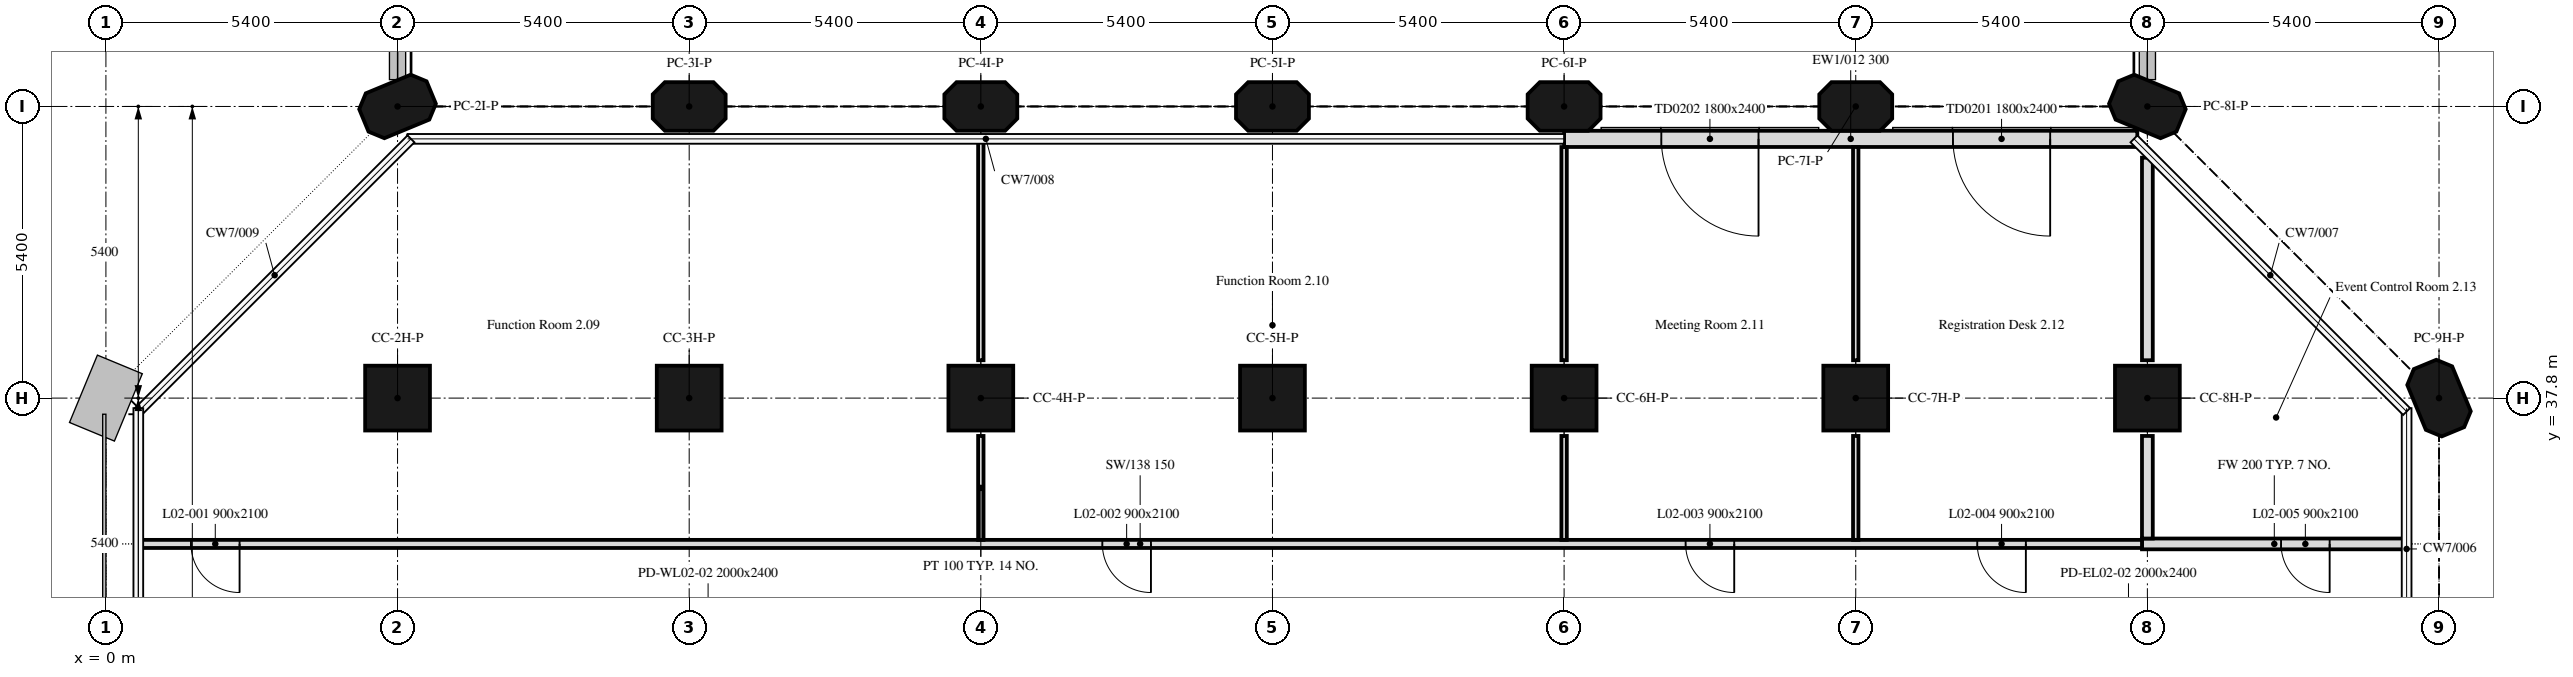
"""IFC4 building model, lengths in metres.
Left out: names, types, materials, properties, quantities, classifications, styles, units other than length and angle.
Written with IfcOpenShell. Run it as: python <this file> out.ifc"""

import sys

from ifc_helpers import new_model, si_unit, direction, frame, frame_2d, origin, origin_2d, place, context, subcontext, project, spatial, polyline, rectangle, outline, extrude, element, fill, save


model = new_model("IFC4")
c1 = context("Model", 3, precision=1e-05, world=origin(), true_north=direction((0.0, 1.0)))
c2 = subcontext(c1, "Body", "Model", "MODEL_VIEW")
j1 = project(units=[si_unit("LENGTHUNIT", "METRE"), si_unit("PLANEANGLEUNIT", "RADIAN")], contexts=[c1])
p1 = place(None, origin())
s1 = spatial("IfcSite", under=j1, at=p1, CompositionType="ELEMENT")
p2 = place(p1, origin())
s2 = spatial("IfcBuilding", under=s1, at=p2, CompositionType="ELEMENT")
p3 = place(p2, frame((0.0, 0.0, 14.4)))
s3 = spatial("IfcBuildingStorey", under=s2, at=p3, CompositionType="ELEMENT", Elevation=14.4)
for number, where, z_axis, x_axis in (
    (1, (5.4, 37.8, 0.0), (0.0, 0.0, 1.0), (1.0, 0.0, 0.0)),
    (2, (10.8, 37.8, 0.0), (0.0, 0.0, 1.0), (1.0, 0.0, 0.0)),
    (3, (16.2, 37.8, 0.0), (0.0, 0.0, 1.0), (1.0, 0.0, 0.0)),
    (4, (21.6, 37.8, 0.0), (0.0, 0.0, 1.0), (1.0, 0.0, 0.0)),
    (5, (27.0, 37.8, 0.0), (0.0, 0.0, 1.0), (1.0, 0.0, 0.0)),
    (6, (32.4, 37.8, 0.0), (0.0, 0.0, 1.0), (1.0, 0.0, 0.0)),
    (7, (37.8, 37.8, 0.0), (0.0, 0.0, 1.0), (1.0, 0.0, 0.0)),
):
    element("IfcColumn", number, at=place(p3, frame(where, z_axis=z_axis, x_axis=x_axis)), inside=s3, PredefinedType="COLUMN", context=c2, shape_type="SweptSolid", body=[
        extrude(rectangle(XDim=1.2, YDim=1.2, at=origin_2d()), origin(), (0.0, 0.0, 1.0), 5.0),
    ])
for number, where, z_axis, x_axis in (
    (8, (43.2, 37.8, 0.0), (0.0, 0.0, 1.0), (-0.383, 0.924, 0.0)),
    (9, (5.4, 43.2, 0.0), (0.0, 0.0, 1.0), (0.924, 0.383, 0.0)),
    (10, (10.8, 43.2, 0.0), (0.0, 0.0, 1.0), (1.0, 0.0, 0.0)),
    (11, (16.2, 43.2, 0.0), (0.0, 0.0, 1.0), (1.0, 0.0, 0.0)),
    (12, (21.6, 43.2, 0.0), (0.0, 0.0, 1.0), (1.0, 0.0, 0.0)),
    (13, (27.0, 43.2, 0.0), (0.0, 0.0, 1.0), (1.0, 0.0, 0.0)),
    (14, (32.4, 43.2, 0.0), (0.0, 0.0, 1.0), (1.0, 0.0, 0.0)),
    (15, (37.8, 43.2, 0.0), (0.0, 0.0, 1.0), (-0.924, 0.383, 0.0)),
):
    element("IfcColumn", number, at=place(p3, frame(where, z_axis=z_axis, x_axis=x_axis)), inside=s3, PredefinedType="COLUMN", context=c2, shape_type="SweptSolid", body=[
        extrude(outline(polyline([(-0.45, -0.45), (0.45, -0.45), (0.675, -0.225), (0.675, 0.225), (0.45, 0.45), (-0.45, 0.45), (-0.675, 0.225), (-0.675, -0.225), (-0.45, -0.45)])), origin(), (0.0, 0.0, 1.0), 5.0),
    ])
p4 = place(p3, frame((37.614, 42.6, 0.0), z_axis=(0.0, 0.0, 1.0), x_axis=(-1.0, 0.0, 0.0)))
e16 = element("IfcWall", 16, at=p4, inside=s3, PredefinedType="SOLIDWALL", context=c2, shape_type="SweptSolid", body=[
    extrude(rectangle(XDim=10.614, YDim=0.3, at=frame_2d((5.307, 0.0))), origin(), (0.0, 0.0, 1.0), 5.0),
])
p5 = place(p4, frame((1.614, 0.0, 0.0)))
e17 = element("IfcOpeningElement", 17, at=p5, cuts=e16, PredefinedType="OPENING", context=c2, shape_type="SweptSolid", body=[
    extrude(rectangle(XDim=1.8, YDim=2.4, at=frame_2d((0.9, 1.2))), frame((0.0, 0.16, 0.0), z_axis=(0.0, -1.0, 0.0), x_axis=(1.0, 0.0, 0.0)), (0.0, 0.0, 1.0), 0.32),
])
p6 = place(p4, frame((7.014, 0.0, 0.0)))
e18 = element("IfcOpeningElement", 18, at=p6, cuts=e16, PredefinedType="OPENING", context=c2, shape_type="SweptSolid", body=[
    extrude(rectangle(XDim=1.8, YDim=2.4, at=frame_2d((0.9, 1.2))), frame((0.0, 0.16, 0.0), z_axis=(0.0, -1.0, 0.0), x_axis=(1.0, 0.0, 0.0)), (0.0, 0.0, 1.0), 0.32),
])
p7 = place(p3, frame((42.6, 35.1, 0.0), z_axis=(0.0, 0.0, 1.0), x_axis=(-1.0, 0.0, 0.0)))
e19 = element("IfcWall", 19, at=p7, inside=s3, PredefinedType="PARTITIONING", context=c2, shape_type="SweptSolid", body=[
    extrude(rectangle(XDim=4.9, YDim=0.2, at=frame_2d((2.45, 0.0))), origin(), (0.0, 0.0, 1.0), 5.0),
])
p8 = place(p7, frame((1.425, 0.0, 0.0)))
e20 = element("IfcOpeningElement", 20, at=p8, cuts=e19, PredefinedType="OPENING", context=c2, shape_type="SweptSolid", body=[
    extrude(rectangle(XDim=0.9, YDim=2.1, at=frame_2d((0.45, 1.05))), frame((0.0, 0.1, 0.0), z_axis=(0.0, -1.0, 0.0), x_axis=(1.0, 0.0, 0.0)), (0.0, 0.0, 1.0), 0.2),
])
p9 = place(p3, frame((37.7, 35.1, 0.0), z_axis=(0.0, 0.0, 1.0), x_axis=(-1.0, 0.0, 0.0)))
e21 = element("IfcWall", 21, at=p9, inside=s3, PredefinedType="PARTITIONING", context=c2, shape_type="SweptSolid", body=[
    extrude(rectangle(XDim=37.1, YDim=0.15, at=frame_2d((18.55, 0.0))), origin(), (0.0, 0.0, 1.0), 5.0),
])
p10 = place(p9, frame((35.225, 0.0, 0.0)))
e22 = element("IfcOpeningElement", 22, at=p10, cuts=e21, PredefinedType="OPENING", context=c2, shape_type="SweptSolid", body=[
    extrude(rectangle(XDim=0.9, YDim=2.1, at=frame_2d((0.45, 1.05))), frame((0.0, 0.075, 0.0), z_axis=(0.0, -1.0, 0.0), x_axis=(1.0, 0.0, 0.0)), (0.0, 0.0, 1.0), 0.15),
])
p11 = place(p9, frame((18.35, 0.0, 0.0)))
e23 = element("IfcOpeningElement", 23, at=p11, cuts=e21, PredefinedType="OPENING", context=c2, shape_type="SweptSolid", body=[
    extrude(rectangle(XDim=0.9, YDim=2.1, at=frame_2d((0.45, 1.05))), frame((0.0, 0.075, 0.0), z_axis=(0.0, -1.0, 0.0), x_axis=(1.0, 0.0, 0.0)), (0.0, 0.0, 1.0), 0.15),
])
p12 = place(p9, frame((7.55, 0.0, 0.0)))
e24 = element("IfcOpeningElement", 24, at=p12, cuts=e21, PredefinedType="OPENING", context=c2, shape_type="SweptSolid", body=[
    extrude(rectangle(XDim=0.9, YDim=2.1, at=frame_2d((0.45, 1.05))), frame((0.0, 0.075, 0.0), z_axis=(0.0, -1.0, 0.0), x_axis=(1.0, 0.0, 0.0)), (0.0, 0.0, 1.0), 0.15),
])
p13 = place(p9, frame((2.15, 0.0, 0.0)))
e25 = element("IfcOpeningElement", 25, at=p13, cuts=e21, PredefinedType="OPENING", context=c2, shape_type="SweptSolid", body=[
    extrude(rectangle(XDim=0.9, YDim=2.1, at=frame_2d((0.45, 1.05))), frame((0.0, 0.075, 0.0), z_axis=(0.0, -1.0, 0.0), x_axis=(1.0, 0.0, 0.0)), (0.0, 0.0, 1.0), 0.15),
])
p14 = place(p3, frame((16.2, 35.175, 0.0), z_axis=(0.0, 0.0, 1.0), x_axis=(0.0, 1.0, 0.0)))
e26 = element("IfcWall", 26, at=p14, inside=s3, PredefinedType="PARTITIONING", context=c2, shape_type="SweptSolid", body=[
    extrude(rectangle(XDim=1.924, YDim=0.1, at=frame_2d((0.962, 0.0))), origin(), (0.0, 0.0, 1.0), 5.0),
])
p15 = place(p3, frame((16.2, 38.501, 0.0), z_axis=(0.0, 0.0, 1.0), x_axis=(0.0, 1.0, 0.0)))
e27 = element("IfcWall", 27, at=p15, inside=s3, PredefinedType="PARTITIONING", context=c2, shape_type="SweptSolid", body=[
    extrude(rectangle(XDim=4.099, YDim=0.1, at=frame_2d((2.05, 0.0))), origin(), (0.0, 0.0, 1.0), 5.0),
])
p16 = place(p3, frame((27.0, 35.175, 0.0), z_axis=(0.0, 0.0, 1.0), x_axis=(0.0, 1.0, 0.0)))
e28 = element("IfcWall", 28, at=p16, inside=s3, PredefinedType="PARTITIONING", context=c2, shape_type="SweptSolid", body=[
    extrude(rectangle(XDim=1.924, YDim=0.1, at=frame_2d((0.962, 0.0))), origin(), (0.0, 0.0, 1.0), 5.0),
])
p17 = place(p3, frame((27.0, 38.501, 0.0), z_axis=(0.0, 0.0, 1.0), x_axis=(0.0, 1.0, 0.0)))
e29 = element("IfcWall", 29, at=p17, inside=s3, PredefinedType="PARTITIONING", context=c2, shape_type="SweptSolid", body=[
    extrude(rectangle(XDim=3.948, YDim=0.1, at=frame_2d((1.974, 0.0))), origin(), (0.0, 0.0, 1.0), 5.0),
])
p18 = place(p3, frame((32.4, 35.175, 0.0), z_axis=(0.0, 0.0, 1.0), x_axis=(0.0, 1.0, 0.0)))
e30 = element("IfcWall", 30, at=p18, inside=s3, PredefinedType="PARTITIONING", context=c2, shape_type="SweptSolid", body=[
    extrude(rectangle(XDim=1.924, YDim=0.1, at=frame_2d((0.962, 0.0))), origin(), (0.0, 0.0, 1.0), 5.0),
])
p19 = place(p3, frame((32.4, 38.501, 0.0), z_axis=(0.0, 0.0, 1.0), x_axis=(0.0, 1.0, 0.0)))
e31 = element("IfcWall", 31, at=p19, inside=s3, PredefinedType="PARTITIONING", context=c2, shape_type="SweptSolid", body=[
    extrude(rectangle(XDim=3.948, YDim=0.1, at=frame_2d((1.974, 0.0))), origin(), (0.0, 0.0, 1.0), 5.0),
])
p20 = place(p3, frame((37.8, 35.2, 0.0), z_axis=(0.0, 0.0, 1.0), x_axis=(0.0, 1.0, 0.0)))
e32 = element("IfcWall", 32, at=p20, inside=s3, PredefinedType="PARTITIONING", context=c2, shape_type="SweptSolid", body=[
    extrude(rectangle(XDim=1.899, YDim=0.2, at=frame_2d((0.95, 0.0))), origin(), (0.0, 0.0, 1.0), 5.0),
])
p21 = place(p3, frame((37.8, 38.501, 0.0), z_axis=(0.0, 0.0, 1.0), x_axis=(0.0, 1.0, 0.0)))
e33 = element("IfcWall", 33, at=p21, inside=s3, PredefinedType="PARTITIONING", context=c2, shape_type="SweptSolid", body=[
    extrude(rectangle(XDim=3.751, YDim=0.2, at=frame_2d((1.875, 0.0))), origin(), (0.0, 0.0, 1.0), 5.0),
])
p22 = place(p5, origin())
e34 = element("IfcDoor", 34, at=p22, inside=s3, OperationType="DOUBLE_DOOR_DOUBLE_SWING", PredefinedType="DOOR", context=c2, shape_type="SweptSolid", body=[
    extrude(rectangle(XDim=1.8, YDim=2.4, at=frame_2d((0.9, 1.2))), frame((0.0, 0.025, 0.0), z_axis=(0.0, -1.0, 0.0), x_axis=(1.0, 0.0, 0.0)), (0.0, 0.0, 1.0), 0.05),
])
fill(e17, e34)
p23 = place(p6, origin())
e35 = element("IfcDoor", 35, at=p23, inside=s3, OperationType="DOUBLE_DOOR_DOUBLE_SWING", PredefinedType="DOOR", context=c2, shape_type="SweptSolid", body=[
    extrude(rectangle(XDim=1.8, YDim=2.4, at=frame_2d((0.9, 1.2))), frame((0.0, 0.025, 0.0), z_axis=(0.0, -1.0, 0.0), x_axis=(1.0, 0.0, 0.0)), (0.0, 0.0, 1.0), 0.05),
])
fill(e18, e35)
p24 = place(p10, origin())
e36 = element("IfcDoor", 36, at=p24, inside=s3, OperationType="SINGLE_SWING_RIGHT", PredefinedType="DOOR", context=c2, shape_type="SweptSolid", body=[
    extrude(rectangle(XDim=0.9, YDim=2.1, at=frame_2d((0.45, 1.05))), frame((0.0, 0.025, 0.0), z_axis=(0.0, -1.0, 0.0), x_axis=(1.0, 0.0, 0.0)), (0.0, 0.0, 1.0), 0.05),
])
fill(e22, e36)
p25 = place(p11, origin())
e37 = element("IfcDoor", 37, at=p25, inside=s3, OperationType="SINGLE_SWING_RIGHT", PredefinedType="DOOR", context=c2, shape_type="SweptSolid", body=[
    extrude(rectangle(XDim=0.9, YDim=2.1, at=frame_2d((0.45, 1.05))), frame((0.0, 0.025, 0.0), z_axis=(0.0, -1.0, 0.0), x_axis=(1.0, 0.0, 0.0)), (0.0, 0.0, 1.0), 0.05),
])
fill(e23, e37)
p26 = place(p12, origin())
e38 = element("IfcDoor", 38, at=p26, inside=s3, OperationType="SINGLE_SWING_RIGHT", PredefinedType="DOOR", context=c2, shape_type="SweptSolid", body=[
    extrude(rectangle(XDim=0.9, YDim=2.1, at=frame_2d((0.45, 1.05))), frame((0.0, 0.025, 0.0), z_axis=(0.0, -1.0, 0.0), x_axis=(1.0, 0.0, 0.0)), (0.0, 0.0, 1.0), 0.05),
])
fill(e24, e38)
p27 = place(p13, origin())
e39 = element("IfcDoor", 39, at=p27, inside=s3, OperationType="SINGLE_SWING_LEFT", PredefinedType="DOOR", context=c2, shape_type="SweptSolid", body=[
    extrude(rectangle(XDim=0.9, YDim=2.1, at=frame_2d((0.45, 1.05))), frame((0.0, 0.025, 0.0), z_axis=(0.0, -1.0, 0.0), x_axis=(1.0, 0.0, 0.0)), (0.0, 0.0, 1.0), 0.05),
])
fill(e25, e39)
p28 = place(p8, origin())
e40 = element("IfcDoor", 40, at=p28, inside=s3, OperationType="SINGLE_SWING_LEFT", PredefinedType="DOOR", context=c2, shape_type="SweptSolid", body=[
    extrude(rectangle(XDim=0.9, YDim=2.1, at=frame_2d((0.45, 1.05))), frame((0.0, 0.025, 0.0), z_axis=(0.0, -1.0, 0.0), x_axis=(1.0, 0.0, 0.0)), (0.0, 0.0, 1.0), 0.05),
])
fill(e20, e40)
save(model, sys.argv[1])
